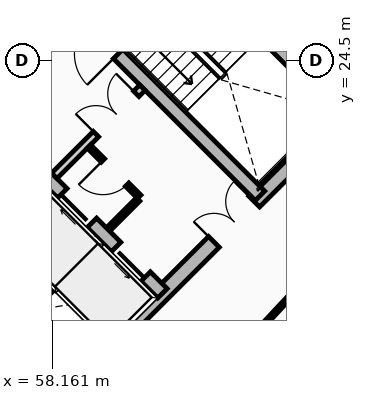
"""IFC4 building model, lengths in metres.
Left out: names, types, materials, properties, quantities, classifications, styles, units other than length and angle.
Written with IfcOpenShell. Run it as: python <this file> out.ifc"""

import sys

from ifc_helpers import new_model, si_unit, direction, frame, frame_2d, origin, place, context, subcontext, project, spatial, rectangle, extrude, source, transform, mapped, element, fill, save


model = new_model("IFC4")
c1 = context("Model", 3, precision=1e-05, world=origin(), true_north=direction((0.0, 1.0)))
c2 = subcontext(c1, "Body", "Model", "MODEL_VIEW")
j1 = project(units=[si_unit("LENGTHUNIT", "METRE"), si_unit("PLANEANGLEUNIT", "RADIAN")], contexts=[c1])
p1 = place(None, origin())
s1 = spatial("IfcSite", under=j1, at=p1, CompositionType="ELEMENT")
p2 = place(p1, origin())
s2 = spatial("IfcBuilding", under=s1, at=p2, CompositionType="ELEMENT")
p3 = place(p2, frame((0.0, 0.0, 229.25)))
s3 = spatial("IfcBuildingStorey", under=s2, at=p3, CompositionType="ELEMENT", Elevation=229.25)
for number, where, z_axis, x_axis in (
    (1, (58.702, 15.732, 0.0), (0.0, 0.0, 1.0), (-0.707, 0.707, 0.0)),
    (2, (66.268, 23.298, 0.0), (0.0, 0.0, 1.0), (-0.707, 0.707, 0.0)),
):
    element("IfcWall", number, at=place(p3, frame(where, z_axis=z_axis, x_axis=x_axis)), inside=s3, PredefinedType="SHEAR", context=c2, shape_type="SweptSolid", body=[
        extrude(rectangle(XDim=14.1, YDim=0.4, at=frame_2d((7.05, 0.0))), origin(), (0.0, 0.0, 1.0), 3.2),
    ])
p4 = place(p3, frame((58.561, 15.873, 0.0), z_axis=(0.0, 0.0, 1.0), x_axis=(0.707106781187, 0.707106781187, 0.0)))
e3 = element("IfcWall", 3, at=p4, inside=s3, PredefinedType="SHEAR", context=c2, shape_type="SweptSolid", body=[
    extrude(rectangle(XDim=10.7, YDim=0.4, at=frame_2d((5.35, 0.0))), origin(), (0.0, 0.0, 1.0), 3.2),
])
m1 = source(origin(), c2, "Body", "SweptSolid", [
    extrude(rectangle(XDim=1.5, YDim=2.02, at=frame_2d((0.75, 1.01))), frame((0.0, 0.21, 0.0), z_axis=(0.0, -1.0, 0.0), x_axis=(1.0, 0.0, 0.0)), (0.0, 0.0, 1.0), 0.42),
])
p5 = place(p4, frame((5.45, 0.0, 0.0)))
e4 = element("IfcOpeningElement", 4, at=p5, cuts=e3, PredefinedType="OPENING", context=c2, shape_type="MappedRepresentation", body=[
    mapped(m1, transform((0.0, 0.0, 0.0), x_axis=(1.0, 0.0, 0.0), y_axis=(0.0, 1.0, 0.0), z_axis=(0.0, 0.0, 1.0), scale=1.0)),
])
p6 = place(p3, frame((61.06, 18.373, 0.0), z_axis=(0.0, 0.0, 1.0), x_axis=(-0.707106781187, 0.707106781187, 0.0)))
e5 = element("IfcWall", 5, at=p6, inside=s3, PredefinedType="SHEAR", context=c2, shape_type="SweptSolid", body=[
    extrude(rectangle(XDim=13.7, YDim=0.35, at=frame_2d((6.85, 0.0))), origin(), (0.0, 0.0, 1.0), 3.2),
])
m2 = source(origin(), c2, "Body", "SweptSolid", [
    extrude(rectangle(XDim=1.1, YDim=2.015, at=frame_2d((0.55, 1.007))), frame((0.0, 0.185, 0.0), z_axis=(0.0, -1.0, 0.0), x_axis=(1.0, 0.0, 0.0)), (0.0, 0.0, 1.0), 0.37),
])
p7 = place(p6, frame((4.85, 0.0, 0.0)))
e6 = element("IfcOpeningElement", 6, at=p7, cuts=e5, PredefinedType="OPENING", context=c2, shape_type="MappedRepresentation", body=[
    mapped(m2, transform((0.0, 0.0, 0.0), x_axis=(1.0, 0.0, 0.0), y_axis=(0.0, 1.0, 0.0), z_axis=(0.0, 0.0, 1.0), scale=1.0)),
])
p8 = place(p6, frame((0.625, 0.0, 0.0)))
e7 = element("IfcOpeningElement", 7, at=p8, cuts=e5, PredefinedType="OPENING", context=c2, shape_type="MappedRepresentation", body=[
    mapped(m2, transform((0.0, 0.0, 0.0), x_axis=(1.0, 0.0, 0.0), y_axis=(0.0, 1.0, 0.0), z_axis=(0.0, 0.0, 1.0), scale=1.0)),
])
p9 = place(p6, frame((2.625, 0.0, 0.0)))
e8 = element("IfcOpeningElement", 8, at=p9, cuts=e5, PredefinedType="OPENING", context=c2, shape_type="MappedRepresentation", body=[
    mapped(m2, transform((0.0, 0.0, 0.0), x_axis=(1.0, 0.0, 0.0), y_axis=(0.0, 1.0, 0.0), z_axis=(0.0, 0.0, 1.0), scale=1.0)),
])
m3 = source(origin(), c2, "Body", "SweptSolid", [
    extrude(rectangle(XDim=1.15, YDim=2.02, at=frame_2d((0.575, 1.01))), frame((0.0, 0.185, 0.0), z_axis=(0.0, -1.0, 0.0), x_axis=(1.0, 0.0, 0.0)), (0.0, 0.0, 1.0), 0.37),
])
p10 = place(p6, frame((7.27, 0.0, 0.0)))
e9 = element("IfcOpeningElement", 9, at=p10, cuts=e5, PredefinedType="OPENING", context=c2, shape_type="MappedRepresentation", body=[
    mapped(m3, transform((0.0, 0.0, 0.0), x_axis=(1.0, 0.0, 0.0), y_axis=(0.0, 1.0, 0.0), z_axis=(0.0, 0.0, 1.0), scale=1.0)),
])
p11 = place(p3, frame((63.627, 20.94, 0.0), z_axis=(0.0, 0.0, 1.0), x_axis=(-0.707119496762, 0.707094065383, 0.0)))
e10 = element("IfcWall", 10, at=p11, inside=s3, PredefinedType="SHEAR", context=c2, shape_type="SweptSolid", body=[
    extrude(rectangle(XDim=9.6, YDim=0.35, at=frame_2d((4.8, 0.0))), origin(), (0.0, 0.0, 1.0), 3.2),
])
p12 = place(p11, frame((5.28, 0.0, 0.0)))
e11 = element("IfcOpeningElement", 11, at=p12, cuts=e10, PredefinedType="OPENING", context=c2, shape_type="MappedRepresentation", body=[
    mapped(m3, transform((0.0, 0.0, 0.0), x_axis=(1.0, 0.0, 0.0), y_axis=(0.0, 1.0, 0.0), z_axis=(0.0, 0.0, 1.0), scale=1.0)),
])
p13 = place(p3, frame((65.812, 23.125, 0.0), z_axis=(0.0, 0.0, 1.0), x_axis=(-0.707106781187, 0.707106781187, 0.0)))
e12 = element("IfcWall", 12, at=p13, inside=s3, PredefinedType="SHEAR", context=c2, shape_type="SweptSolid", body=[
    extrude(rectangle(XDim=6.695, YDim=0.35, at=frame_2d((3.348, 0.0))), origin(), (0.0, 0.0, 1.0), 3.2),
])
p14 = place(p3, frame((57.284, 17.673, 0.0), z_axis=(0.0, 0.0, 1.0), x_axis=(0.707147878904, 0.70706568108, 0.0)))
e13 = element("IfcWall", 13, at=p14, inside=s3, PredefinedType="SHEAR", context=c2, shape_type="SweptSolid", body=[
    extrude(rectangle(XDim=2.97, YDim=0.2, at=frame_2d((1.485, 0.0))), origin(), (0.0, 0.0, 1.0), 3.2),
])
p15 = place(p3, frame((58.737, 16.644, 0.0), z_axis=(0.0, 0.0, 1.0), x_axis=(-0.707032117043, 0.707181437447, 0.0)))
e14 = element("IfcWall", 14, at=p15, inside=s3, PredefinedType="SHEAR", context=c2, shape_type="SweptSolid", body=[
    extrude(rectangle(XDim=1.635, YDim=0.2, at=frame_2d((0.817, 0.0))), origin(), (0.0, 0.0, 1.0), 3.2),
])
p16 = place(p3, frame((58.214, 21.467, 0.0), z_axis=(0.0, 0.0, 1.0), x_axis=(0.707106781187, 0.707106781187, 0.0)))
e15 = element("IfcWall", 15, at=p16, inside=s3, PredefinedType="PARTITIONING", context=c2, shape_type="SweptSolid", body=[
    extrude(rectangle(XDim=3.28, YDim=0.2, at=frame_2d((1.64, 0.0))), origin(), (0.0, 0.0, 1.0), 2.975),
])
m4 = source(origin(), c2, "Body", "SweptSolid", [
    extrude(rectangle(XDim=1.5, YDim=2.02, at=frame_2d((0.75, 1.01))), frame((0.0, 0.11, 0.0), z_axis=(0.0, -1.0, 0.0), x_axis=(1.0, 0.0, 0.0)), (0.0, 0.0, 1.0), 0.22),
])
p17 = place(p16, frame((1.55, 0.0, 0.0)))
e16 = element("IfcOpeningElement", 16, at=p17, cuts=e15, PredefinedType="OPENING", context=c2, shape_type="MappedRepresentation", body=[
    mapped(m4, transform((0.0, 0.0, 0.0), x_axis=(1.0, 0.0, 0.0), y_axis=(0.0, 1.0, 0.0), z_axis=(0.0, 0.0, 1.0), scale=1.0)),
])
p18 = place(p3, frame((60.448, 20.915, 0.0), z_axis=(0.0, 0.0, 1.0), x_axis=(-0.707106781187, 0.707106781187, 0.0)))
e17 = element("IfcWall", 17, at=p18, inside=s3, PredefinedType="PARTITIONING", context=c2, shape_type="SweptSolid", body=[
    extrude(rectangle(XDim=1.87, YDim=0.125, at=frame_2d((0.935, 0.0))), origin(), (0.0, 0.0, 1.0), 2.975),
])
m5 = source(origin(), c2, "Body", "SweptSolid", [
    extrude(rectangle(XDim=0.9, YDim=2.005, at=frame_2d((0.45, 1.002))), frame((0.0, 0.073, 0.0), z_axis=(0.0, -1.0, 0.0), x_axis=(1.0, 0.0, 0.0)), (0.0, 0.0, 1.0), 0.145),
])
p19 = place(p18, frame((0.45, 0.0, 0.0)))
e18 = element("IfcOpeningElement", 18, at=p19, cuts=e17, PredefinedType="OPENING", context=c2, shape_type="MappedRepresentation", body=[
    mapped(m5, transform((0.0, 0.0, 0.0), x_axis=(1.0, 0.0, 0.0), y_axis=(0.0, 1.0, 0.0), z_axis=(0.0, 0.0, 1.0), scale=1.0)),
])
p20 = place(p3, frame((59.643, 20.066, 0.0), z_axis=(0.0, 0.0, 1.0), x_axis=(0.707106781187, 0.707106781187, 0.0)))
e19 = element("IfcWall", 19, at=p20, inside=s3, PredefinedType="PARTITIONING", context=c2, shape_type="SweptSolid", body=[
    extrude(rectangle(XDim=1.1, YDim=0.125, at=frame_2d((0.55, 0.0))), origin(), (0.0, 0.0, 1.0), 2.975),
])
p21 = place(p3, frame((62.903, 16.667, 0.0), z_axis=(0.0, 0.0, 1.0), x_axis=(0.682371947497, 0.731005147225, 0.0)))
e20 = element("IfcWall", 20, at=p21, inside=s3, PredefinedType="MOVABLE", context=c2, shape_type="SweptSolid", body=[
    extrude(rectangle(XDim=6.642, YDim=0.1, at=frame_2d((3.321, 0.0))), origin(), (0.0, 0.0, 1.0), 2.545),
])
m6 = source(origin(), c2, "Body", "SweptSolid", [
    extrude(rectangle(XDim=1.05, YDim=2.015, at=frame_2d((0.525, 1.007))), frame((0.0, 0.06, 0.0), z_axis=(0.0, -1.0, 0.0), x_axis=(1.0, 0.0, 0.0)), (0.0, 0.0, 1.0), 0.12),
])
p22 = place(p21, frame((2.796, 0.0, 0.0)))
e21 = element("IfcOpeningElement", 21, at=p22, cuts=e20, PredefinedType="OPENING", context=c2, shape_type="MappedRepresentation", body=[
    mapped(m6, transform((0.0, 0.0, 0.0), x_axis=(1.0, 0.0, 0.0), y_axis=(0.0, 1.0, 0.0), z_axis=(0.0, 0.0, 1.0), scale=1.0)),
])
m7 = source(origin(), c2, "Body", "SweptSolid", [
    extrude(rectangle(XDim=1.1, YDim=2.015, at=frame_2d((0.55, 1.007))), frame((0.0, 0.025, 0.0), z_axis=(0.0, -1.0, 0.0), x_axis=(1.0, 0.0, 0.0)), (0.0, 0.0, 1.0), 0.05),
])
p23 = place(p8, origin())
e22 = element("IfcDoor", 22, at=p23, inside=s3, OperationType="SLIDING_TO_LEFT", PredefinedType="DOOR", context=c2, shape_type="MappedRepresentation", body=[
    mapped(m7, transform((0.0, 0.0, 0.0), x_axis=(1.0, 0.0, 0.0), y_axis=(0.0, 1.0, 0.0), z_axis=(0.0, 0.0, 1.0), scale=1.0)),
])
fill(e7, e22)
p24 = place(p9, origin())
e23 = element("IfcDoor", 23, at=p24, inside=s3, OperationType="SLIDING_TO_RIGHT", PredefinedType="DOOR", context=c2, shape_type="MappedRepresentation", body=[
    mapped(m7, transform((0.0, 0.0, 0.0), x_axis=(1.0, 0.0, 0.0), y_axis=(0.0, 1.0, 0.0), z_axis=(0.0, 0.0, 1.0), scale=1.0)),
])
fill(e8, e23)
m8 = source(origin(), c2, "Body", "SweptSolid", [
    extrude(rectangle(XDim=1.15, YDim=2.02, at=frame_2d((0.575, 1.01))), frame((0.0, 0.025, 0.0), z_axis=(0.0, -1.0, 0.0), x_axis=(1.0, 0.0, 0.0)), (0.0, 0.0, 1.0), 0.05),
])
p25 = place(p12, origin())
e24 = element("IfcDoor", 24, at=p25, inside=s3, OperationType="SINGLE_SWING_LEFT", PredefinedType="DOOR", context=c2, shape_type="MappedRepresentation", body=[
    mapped(m8, transform((0.0, 0.0, 0.0), x_axis=(1.0, 0.0, 0.0), y_axis=(0.0, 1.0, 0.0), z_axis=(0.0, 0.0, 1.0), scale=1.0)),
])
fill(e11, e24)
m9 = source(origin(), c2, "Body", "SweptSolid", [
    extrude(rectangle(XDim=1.5, YDim=2.02, at=frame_2d((0.75, 1.01))), frame((0.0, 0.025, 0.0), z_axis=(0.0, -1.0, 0.0), x_axis=(1.0, 0.0, 0.0)), (0.0, 0.0, 1.0), 0.05),
])
p26 = place(p5, origin())
e25 = element("IfcDoor", 25, at=p26, inside=s3, OperationType="DOUBLE_DOOR_SINGLE_SWING", PredefinedType="DOOR", context=c2, shape_type="MappedRepresentation", body=[
    mapped(m9, transform((0.0, 0.0, 0.0), x_axis=(1.0, 0.0, 0.0), y_axis=(0.0, 1.0, 0.0), z_axis=(0.0, 0.0, 1.0), scale=1.0)),
])
fill(e4, e25)
p27 = place(p17, origin())
e26 = element("IfcDoor", 26, at=p27, inside=s3, OperationType="DOUBLE_DOOR_SINGLE_SWING", PredefinedType="DOOR", context=c2, shape_type="MappedRepresentation", body=[
    mapped(m9, transform((0.0, 0.0, 0.0), x_axis=(1.0, 0.0, 0.0), y_axis=(0.0, 1.0, 0.0), z_axis=(0.0, 0.0, 1.0), scale=1.0)),
])
fill(e16, e26)
m10 = source(origin(), c2, "Body", "SweptSolid", [
    extrude(rectangle(XDim=0.9, YDim=2.005, at=frame_2d((0.45, 1.002))), frame((0.0, 0.025, 0.0), z_axis=(0.0, -1.0, 0.0), x_axis=(1.0, 0.0, 0.0)), (0.0, 0.0, 1.0), 0.05),
])
p28 = place(p19, origin())
e27 = element("IfcDoor", 27, at=p28, inside=s3, OperationType="SINGLE_SWING_RIGHT", PredefinedType="DOOR", context=c2, shape_type="MappedRepresentation", body=[
    mapped(m10, transform((0.0, 0.0, 0.0), x_axis=(1.0, 0.0, 0.0), y_axis=(0.0, 1.0, 0.0), z_axis=(0.0, 0.0, 1.0), scale=1.0)),
])
fill(e18, e27)
save(model, sys.argv[1])
